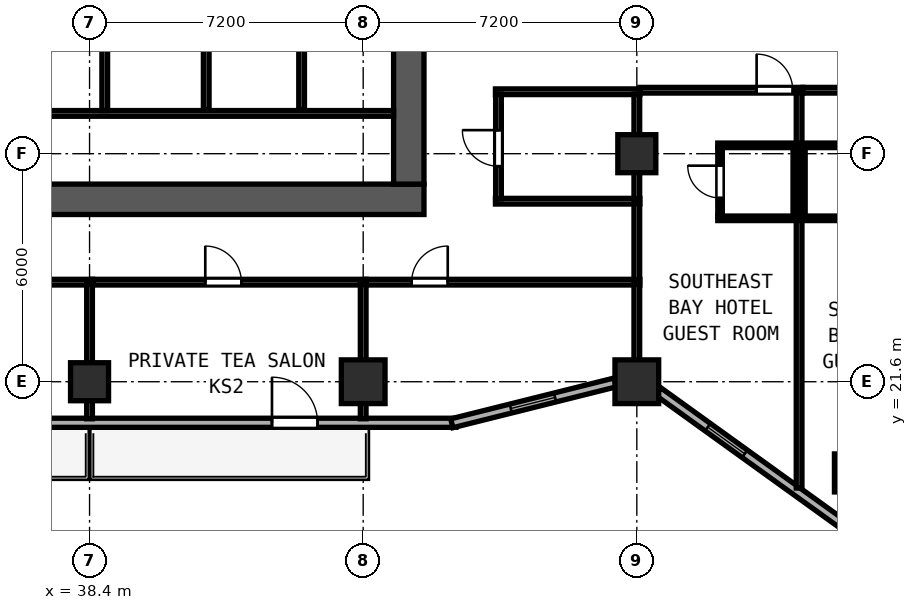
"""IFC4 building model, lengths in metres.
Left out: names, types, materials, properties, quantities, classifications, styles, units other than length and angle.
Written with IfcOpenShell. Run it as: python <this file> out.ifc"""

import sys

from ifc_helpers import new_model, si_unit, direction, frame, frame_2d, origin, origin_2d, place, context, subcontext, project, spatial, rectangle, hollow_rectangle, extrude, element, fill, save


model = new_model("IFC4")
c1 = context("Model", 3, precision=1e-05, world=origin(), true_north=direction((0.0, 1.0)))
c2 = subcontext(c1, "Body", "Model", "MODEL_VIEW")
j1 = project(units=[si_unit("LENGTHUNIT", "METRE"), si_unit("PLANEANGLEUNIT", "RADIAN")], contexts=[c1])
p1 = place(None, origin())
s1 = spatial("IfcSite", under=j1, at=p1, CompositionType="ELEMENT")
p2 = place(p1, origin())
s2 = spatial("IfcBuilding", under=s1, at=p2, CompositionType="ELEMENT")
p3 = place(p2, frame((0.0, 0.0, 62.8)))
s3 = spatial("IfcBuildingStorey", under=s2, at=p3, CompositionType="ELEMENT", Elevation=62.8)
p4 = place(p3, frame((29.6, 26.4, 0.0), z_axis=(0.0, 0.0, 1.0), x_axis=(1.0, 0.0, 0.0)))
e1 = element("IfcWall", 1, at=p4, inside=s3, PredefinedType="SHEAR", context=c2, shape_type="SweptSolid", body=[
    extrude(rectangle(XDim=17.6, YDim=0.8, at=frame_2d((8.8, 0.0))), origin(), (0.0, 0.0, 1.0), 3.6),
])
p5 = place(p4, frame((2.47, 0.0, 0.0), z_axis=(0.0, 0.0, 1.0), x_axis=(-1.0, 0.0, 0.0)))
e2 = element("IfcOpeningElement", 2, at=p5, cuts=e1, PredefinedType="OPENING", context=c2, shape_type="SweptSolid", body=[
    extrude(rectangle(XDim=0.9, YDim=2.1, at=frame_2d((0.45, 1.05))), frame((0.0, 0.41, 0.0), z_axis=(0.0, -1.0, 0.0), x_axis=(1.0, 0.0, 0.0)), (0.0, 0.0, 1.0), 0.82),
])
p6 = place(p4, frame((6.36, 0.0, 0.0), z_axis=(0.0, 0.0, 1.0), x_axis=(-1.0, 0.0, 0.0)))
e3 = element("IfcOpeningElement", 3, at=p6, cuts=e1, PredefinedType="OPENING", context=c2, shape_type="SweptSolid", body=[
    extrude(rectangle(XDim=0.9, YDim=2.1, at=frame_2d((0.45, 1.05))), frame((0.0, 0.41, 0.0), z_axis=(0.0, -1.0, 0.0), x_axis=(1.0, 0.0, 0.0)), (0.0, 0.0, 1.0), 0.82),
])
p7 = place(p3, frame((46.8, 26.8, 0.0), z_axis=(0.0, 0.0, 1.0), x_axis=(0.0, 1.0, 0.0)))
e4 = element("IfcWall", 4, at=p7, inside=s3, PredefinedType="SHEAR", context=c2, shape_type="SweptSolid", body=[
    extrude(rectangle(XDim=4.05, YDim=0.8, at=frame_2d((2.025, 0.0))), origin(), (0.0, 0.0, 1.0), 3.6),
])
for number, where, z_axis, x_axis in (
    (5, (52.8, 21.6, 0.0), (0.0, 0.0, 1.0), (1.0, 0.0, 0.0)),
    (6, (45.6, 21.6, 0.0), (0.0, 0.0, 1.0), (1.0, 0.0, 0.0)),
):
    element("IfcColumn", number, at=place(p3, frame(where, z_axis=z_axis, x_axis=x_axis)), inside=s3, PredefinedType="COLUMN", context=c2, shape_type="SweptSolid", body=[
        extrude(hollow_rectangle(XDim=1.15, YDim=1.15, WallThickness=0.042, at=origin_2d()), origin(), (0.0, 0.0, 1.0), 3.8),
    ])
for number, where, z_axis, x_axis in (
    (7, (52.8, 27.6, 0.0), (0.0, 0.0, 1.0), (1.0, 0.0, 0.0)),
    (8, (38.4, 21.6, 0.0), (0.0, 0.0, 1.0), (1.0, 0.0, 0.0)),
    (9, (58.5, 19.2, 0.0), (0.0, 0.0, 1.0), (1.0, 0.0, 0.0)),
):
    element("IfcColumn", number, at=place(p3, frame(where, z_axis=z_axis, x_axis=x_axis)), inside=s3, PredefinedType="COLUMN", context=c2, shape_type="SweptSolid", body=[
        extrude(hollow_rectangle(XDim=1.0, YDim=1.0, WallThickness=0.038, at=origin_2d()), origin(), (0.0, 0.0, 1.0), 3.8),
    ])
p8 = place(p3, frame((28.76, 20.52, 0.0), z_axis=(0.0, 0.0, 1.0), x_axis=(1.0, 0.0, 0.0)))
e10 = element("IfcWall", 10, at=p8, inside=s3, PredefinedType="SOLIDWALL", context=c2, shape_type="SweptSolid", body=[
    extrude(rectangle(XDim=19.281, YDim=0.24, at=frame_2d((9.64, 0.0))), origin(), (0.0, 0.0, 1.0), 3.6),
])
p9 = place(p8, frame((4.84, 0.0, 0.0), z_axis=(0.0, 0.0, 1.0), x_axis=(-1.0, 0.0, 0.0)))
e11 = element("IfcOpeningElement", 11, at=p9, cuts=e10, PredefinedType="OPENING", context=c2, shape_type="SweptSolid", body=[
    extrude(rectangle(XDim=1.2, YDim=2.15, at=frame_2d((0.6, 1.075))), frame((0.0, 0.13, 0.0), z_axis=(0.0, -1.0, 0.0), x_axis=(1.0, 0.0, 0.0)), (0.0, 0.0, 1.0), 0.26),
])
p10 = place(p8, frame((15.64, 0.0, 0.0), z_axis=(0.0, 0.0, 1.0), x_axis=(-1.0, 0.0, 0.0)))
e12 = element("IfcOpeningElement", 12, at=p10, cuts=e10, PredefinedType="OPENING", context=c2, shape_type="SweptSolid", body=[
    extrude(rectangle(XDim=1.2, YDim=2.15, at=frame_2d((0.6, 1.075))), frame((0.0, 0.13, 0.0), z_axis=(0.0, -1.0, 0.0), x_axis=(1.0, 0.0, 0.0)), (0.0, 0.0, 1.0), 0.26),
])
p11 = place(p3, frame((47.932, 20.507, 0.0), z_axis=(0.0, 0.0, 1.0), x_axis=(0.970145739396, 0.242522667667, 0.0)))
e13 = element("IfcWall", 13, at=p11, inside=s3, PredefinedType="SOLIDWALL", context=c2, shape_type="SweptSolid", body=[
    extrude(rectangle(XDim=4.433, YDim=0.24, at=frame_2d((2.217, 0.0))), origin(), (0.0, 0.0, 1.0), 3.097),
])
p12 = place(p11, frame((1.6, 0.0, 0.85)))
e14 = element("IfcOpeningElement", 14, at=p12, cuts=e13, PredefinedType="OPENING", context=c2, shape_type="SweptSolid", body=[
    extrude(rectangle(XDim=1.2, YDim=1.85, at=frame_2d((0.6, 0.925))), frame((0.0, 0.13, 0.0), z_axis=(0.0, -1.0, 0.0), x_axis=(1.0, 0.0, 0.0)), (0.0, 0.0, 1.0), 0.26),
])
p13 = place(p3, frame((53.367, 21.34, 0.0), z_axis=(0.0, 0.0, 1.0), x_axis=(0.811543176492, -0.58429245476, 0.0)))
e15 = element("IfcWall", 15, at=p13, inside=s3, PredefinedType="SOLIDWALL", context=c2, shape_type="SweptSolid", body=[
    extrude(rectangle(XDim=11.531, YDim=0.24, at=frame_2d((5.765, 0.0))), origin(), (0.0, 0.0, 1.0), 3.097),
])
p14 = place(p13, frame((1.6, 0.0, 0.85)))
e16 = element("IfcOpeningElement", 16, at=p14, cuts=e15, PredefinedType="OPENING", context=c2, shape_type="SweptSolid", body=[
    extrude(rectangle(XDim=1.2, YDim=1.85, at=frame_2d((0.6, 0.925))), frame((0.0, 0.13, 0.0), z_axis=(0.0, -1.0, 0.0), x_axis=(1.0, 0.0, 0.0)), (0.0, 0.0, 1.0), 0.26),
])
p15 = place(p13, frame((7.0, 0.0, 0.85)))
e17 = element("IfcOpeningElement", 17, at=p15, cuts=e15, PredefinedType="OPENING", context=c2, shape_type="SweptSolid", body=[
    extrude(rectangle(XDim=1.2, YDim=1.85, at=frame_2d((0.6, 0.925))), frame((0.0, 0.13, 0.0), z_axis=(0.0, -1.0, 0.0), x_axis=(1.0, 0.0, 0.0)), (0.0, 0.0, 1.0), 0.26),
])
p16 = place(p13, frame((9.99, 0.0, 0.85)))
e18 = element("IfcOpeningElement", 18, at=p16, cuts=e15, PredefinedType="OPENING", context=c2, shape_type="SweptSolid", body=[
    extrude(rectangle(XDim=1.2, YDim=1.85, at=frame_2d((0.6, 0.925))), frame((0.0, 0.13, 0.0), z_axis=(0.0, -1.0, 0.0), x_axis=(1.0, 0.0, 0.0)), (0.0, 0.0, 1.0), 0.26),
])
p17 = place(p3, frame((30.4, 28.66, 0.0), z_axis=(0.0, 0.0, 1.0), x_axis=(1.0, 0.0, 0.0)))
e19 = element("IfcWall", 19, at=p17, inside=s3, PredefinedType="PARTITIONING", context=c2, shape_type="SweptSolid", body=[
    extrude(rectangle(XDim=16.0, YDim=0.15, at=frame_2d((8.0, 0.0))), origin(), (0.0, 0.0, 1.0), 3.6),
])
p18 = place(p3, frame((38.8, 28.735, 0.0), z_axis=(0.0, 0.0, 1.0), x_axis=(0.0, 1.0, 0.0)))
e20 = element("IfcWall", 20, at=p18, inside=s3, PredefinedType="SOLIDWALL", context=c2, shape_type="SweptSolid", body=[
    extrude(rectangle(XDim=1.985, YDim=0.15, at=frame_2d((0.992, 0.0))), origin(), (0.0, 0.0, 1.0), 3.6),
])
for number, where, z_axis, x_axis in (
    (21, (41.47, 28.75, 0.0), (0.0, 0.0, 1.0), (0.0, 1.0, 0.0)),
    (22, (43.98, 28.75, 0.0), (0.0, 0.0, 1.0), (0.0, 1.0, 0.0)),
):
    element("IfcWall", number, at=place(p3, frame(where, z_axis=z_axis, x_axis=x_axis)), inside=s3, PredefinedType="SOLIDWALL", context=c2, shape_type="SweptSolid", body=[
        extrude(rectangle(XDim=1.985, YDim=0.15, at=frame_2d((0.993, 0.0))), origin(), (0.0, 0.0, 1.0), 3.6),
    ])
for number, where, z_axis, x_axis in (
    (23, (49.08, 29.23, 0.0), (0.0, 0.0, 1.0), (1.0, 0.0, 0.0)),
    (24, (49.08, 26.35, 0.0), (0.0, 0.0, 1.0), (1.0, 0.0, 0.0)),
):
    element("IfcWall", number, at=place(p3, frame(where, z_axis=z_axis, x_axis=x_axis)), inside=s3, PredefinedType="PARTITIONING", context=c2, shape_type="SweptSolid", body=[
        extrude(rectangle(XDim=3.8, YDim=0.15, at=frame_2d((1.9, 0.0))), origin(), (0.0, 0.0, 1.0), 3.6),
    ])
p19 = place(p3, frame((49.16, 26.41, 0.0), z_axis=(0.0, 0.0, 1.0), x_axis=(0.0, 1.0, 0.0)))
e25 = element("IfcWall", 25, at=p19, inside=s3, PredefinedType="PARTITIONING", context=c2, shape_type="SweptSolid", body=[
    extrude(rectangle(XDim=2.76, YDim=0.15, at=frame_2d((1.38, 0.0))), origin(), (0.0, 0.0, 1.0), 3.6),
])
p20 = place(p19, frame((0.86, 0.0, 0.0)))
e26 = element("IfcOpeningElement", 26, at=p20, cuts=e25, PredefinedType="OPENING", context=c2, shape_type="SweptSolid", body=[
    extrude(rectangle(XDim=0.95, YDim=2.12, at=frame_2d((0.475, 1.06))), frame((0.0, 0.085, 0.0), z_axis=(0.0, -1.0, 0.0), x_axis=(1.0, 0.0, 0.0)), (0.0, 0.0, 1.0), 0.17),
])
p21 = place(p3, frame((52.8, 26.41, 0.0), z_axis=(0.0, 0.0, 1.0), x_axis=(0.0, 1.0, 0.0)))
e27 = element("IfcWall", 27, at=p21, inside=s3, PredefinedType="PARTITIONING", context=c2, shape_type="SweptSolid", body=[
    extrude(rectangle(XDim=2.76, YDim=0.15, at=frame_2d((1.38, 0.0))), origin(), (0.0, 0.0, 1.0), 3.097),
])
p22 = place(p3, frame((23.92, 24.22, 0.0), z_axis=(0.0, 0.0, 1.0), x_axis=(1.0, 0.0, 0.0)))
e28 = element("IfcWall", 28, at=p22, inside=s3, PredefinedType="PARTITIONING", context=c2, shape_type="SweptSolid", body=[
    extrude(rectangle(XDim=14.56, YDim=0.15, at=frame_2d((7.28, 0.0))), origin(), (0.0, 0.0, 1.0), 3.6),
])
p23 = place(p22, frame((9.445, 0.0, 0.0), z_axis=(0.0, 0.0, 1.0), x_axis=(-1.0, 0.0, 0.0)))
e29 = element("IfcOpeningElement", 29, at=p23, cuts=e28, PredefinedType="OPENING", context=c2, shape_type="SweptSolid", body=[
    extrude(rectangle(XDim=0.95, YDim=2.12, at=frame_2d((0.475, 1.06))), frame((0.0, 0.085, 0.0), z_axis=(0.0, -1.0, 0.0), x_axis=(1.0, 0.0, 0.0)), (0.0, 0.0, 1.0), 0.17),
])
p24 = place(p3, frame((38.4, 20.625, 0.0), z_axis=(0.0, 0.0, 1.0), x_axis=(0.0, 1.0, 0.0)))
e30 = element("IfcWall", 30, at=p24, inside=s3, PredefinedType="PARTITIONING", context=c2, shape_type="SweptSolid", body=[
    extrude(rectangle(XDim=3.535, YDim=0.15, at=frame_2d((1.768, 0.0))), origin(), (0.0, 0.0, 1.0), 2.985),
])
p25 = place(p3, frame((38.482, 24.22, 0.0), z_axis=(0.0, 0.0, 1.0), x_axis=(1.0, 0.0, 0.0)))
e31 = element("IfcWall", 31, at=p25, inside=s3, PredefinedType="PARTITIONING", context=c2, shape_type="SweptSolid", body=[
    extrude(rectangle(XDim=7.198, YDim=0.15, at=frame_2d((3.599, 0.0))), origin(), (0.0, 0.0, 1.0), 3.6),
])
p26 = place(p25, frame((3.913, 0.0, 0.0), z_axis=(0.0, 0.0, 1.0), x_axis=(-1.0, 0.0, 0.0)))
e32 = element("IfcOpeningElement", 32, at=p26, cuts=e31, PredefinedType="OPENING", context=c2, shape_type="SweptSolid", body=[
    extrude(rectangle(XDim=0.95, YDim=2.12, at=frame_2d((0.475, 1.06))), frame((0.0, 0.085, 0.0), z_axis=(0.0, -1.0, 0.0), x_axis=(1.0, 0.0, 0.0)), (0.0, 0.0, 1.0), 0.17),
])
p27 = place(p3, frame((45.6, 20.625, 0.0), z_axis=(0.0, 0.0, 1.0), x_axis=(0.0, 1.0, 0.0)))
e33 = element("IfcWall", 33, at=p27, inside=s3, PredefinedType="PARTITIONING", context=c2, shape_type="SweptSolid", body=[
    extrude(rectangle(XDim=3.535, YDim=0.15, at=frame_2d((1.768, 0.0))), origin(), (0.0, 0.0, 1.0), 2.985),
])
p28 = place(p3, frame((45.682, 24.22, 0.0), z_axis=(0.0, 0.0, 1.0), x_axis=(1.0, 0.0, 0.0)))
e34 = element("IfcWall", 34, at=p28, inside=s3, PredefinedType="PARTITIONING", context=c2, shape_type="SweptSolid", body=[
    extrude(rectangle(XDim=7.198, YDim=0.15, at=frame_2d((3.599, 0.0))), origin(), (0.0, 0.0, 1.0), 3.6),
])
p29 = place(p28, frame((2.143, 0.0, 0.0), z_axis=(0.0, 0.0, 1.0), x_axis=(-1.0, 0.0, 0.0)))
e35 = element("IfcOpeningElement", 35, at=p29, cuts=e34, PredefinedType="OPENING", context=c2, shape_type="SweptSolid", body=[
    extrude(rectangle(XDim=0.95, YDim=2.12, at=frame_2d((0.475, 1.06))), frame((0.0, 0.085, 0.0), z_axis=(0.0, -1.0, 0.0), x_axis=(1.0, 0.0, 0.0)), (0.0, 0.0, 1.0), 0.17),
])
p30 = place(p3, frame((52.8, 21.819, 0.0), z_axis=(0.0, 0.0, 1.0), x_axis=(0.0, 1.0, 0.0)))
e36 = element("IfcWall", 36, at=p30, inside=s3, PredefinedType="PARTITIONING", context=c2, shape_type="SweptSolid", body=[
    extrude(rectangle(XDim=2.341, YDim=0.15, at=frame_2d((1.171, 0.0))), origin(), (0.0, 0.0, 1.0), 3.097),
])
p31 = place(p3, frame((52.882, 29.27, 0.0), z_axis=(0.0, 0.0, 1.0), x_axis=(1.0, 0.0, 0.0)))
e37 = element("IfcWall", 37, at=p31, inside=s3, PredefinedType="PARTITIONING", context=c2, shape_type="SweptSolid", body=[
    extrude(rectangle(XDim=4.288, YDim=0.15, at=frame_2d((2.144, 0.0))), origin(), (0.0, 0.0, 1.0), 3.6),
])
p32 = place(p31, frame((4.02, 0.0, 0.0), z_axis=(0.0, 0.0, 1.0), x_axis=(-1.0, 0.0, 0.0)))
e38 = element("IfcOpeningElement", 38, at=p32, cuts=e37, PredefinedType="OPENING", context=c2, shape_type="SweptSolid", body=[
    extrude(rectangle(XDim=0.95, YDim=2.15, at=frame_2d((0.475, 1.075))), frame((0.0, 0.085, 0.0), z_axis=(0.0, -1.0, 0.0), x_axis=(1.0, 0.0, 0.0)), (0.0, 0.0, 1.0), 0.17),
])
p33 = place(p3, frame((52.8, 24.28, 0.0), z_axis=(0.0, 0.0, 1.0), x_axis=(0.0, 1.0, 0.0)))
e39 = element("IfcWall", 39, at=p33, inside=s3, PredefinedType="PARTITIONING", context=c2, shape_type="SweptSolid", body=[
    extrude(rectangle(XDim=2.01, YDim=0.15, at=frame_2d((1.005, 0.0))), origin(), (0.0, 0.0, 1.0), 3.097),
])
p34 = place(p3, frame((57.07, 18.803, 0.0), z_axis=(0.0, 0.0, 1.0), x_axis=(0.0, 1.0, 0.0)))
e40 = element("IfcWall", 40, at=p34, inside=s3, PredefinedType="PARTITIONING", context=c2, shape_type="SweptSolid", body=[
    extrude(rectangle(XDim=10.407, YDim=0.15, at=frame_2d((5.204, 0.0))), origin(), (0.0, 0.0, 1.0), 3.6),
])
p35 = place(p3, frame((54.93, 27.82, 0.0), z_axis=(0.0, 0.0, 1.0), x_axis=(1.0, 0.0, 0.0)))
e41 = element("IfcWall", 41, at=p35, inside=s3, PredefinedType="PARTITIONING", context=c2, shape_type="SweptSolid", body=[
    extrude(rectangle(XDim=2.08, YDim=0.12, at=frame_2d((1.04, 0.0))), origin(), (0.0, 0.0, 1.0), 3.097),
])
p36 = place(p3, frame((54.93, 25.9, 0.0), z_axis=(0.0, 0.0, 1.0), x_axis=(1.0, 0.0, 0.0)))
e42 = element("IfcWall", 42, at=p36, inside=s3, PredefinedType="PARTITIONING", context=c2, shape_type="SweptSolid", body=[
    extrude(rectangle(XDim=2.08, YDim=0.12, at=frame_2d((1.04, 0.0))), origin(), (0.0, 0.0, 1.0), 3.6),
])
p37 = place(p3, frame((54.99, 25.945, 0.0), z_axis=(0.0, 0.0, 1.0), x_axis=(0.0, 1.0, 0.0)))
e43 = element("IfcWall", 43, at=p37, inside=s3, PredefinedType="PARTITIONING", context=c2, shape_type="SweptSolid", body=[
    extrude(rectangle(XDim=1.83, YDim=0.12, at=frame_2d((0.915, 0.0))), origin(), (0.0, 0.0, 1.0), 3.6),
])
p38 = place(p37, frame((1.34, 0.0, 0.0), z_axis=(0.0, 0.0, 1.0), x_axis=(-1.0, 0.0, 0.0)))
e44 = element("IfcOpeningElement", 44, at=p38, cuts=e43, PredefinedType="OPENING", context=c2, shape_type="SweptSolid", body=[
    extrude(rectangle(XDim=0.85, YDim=2.1, at=frame_2d((0.425, 1.05))), frame((0.0, 0.07, 0.0), z_axis=(0.0, -1.0, 0.0), x_axis=(1.0, 0.0, 0.0)), (0.0, 0.0, 1.0), 0.14),
])
p39 = place(p3, frame((56.97, 25.945, 0.0), z_axis=(0.0, 0.0, 1.0), x_axis=(0.0, 1.0, 0.0)))
e45 = element("IfcWall", 45, at=p39, inside=s3, PredefinedType="PARTITIONING", context=c2, shape_type="SweptSolid", body=[
    extrude(rectangle(XDim=1.83, YDim=0.12, at=frame_2d((0.915, 0.0))), origin(), (0.0, 0.0, 1.0), 3.6),
])
p40 = place(p3, frame((57.172, 29.27, 0.0), z_axis=(0.0, 0.0, 1.0), x_axis=(1.0, 0.0, 0.0)))
e46 = element("IfcWall", 46, at=p40, inside=s3, PredefinedType="PARTITIONING", context=c2, shape_type="SweptSolid", body=[
    extrude(rectangle(XDim=4.268, YDim=0.15, at=frame_2d((2.134, 0.0))), origin(), (0.0, 0.0, 1.0), 3.6),
])
p41 = place(p40, frame((2.959, 0.0, 0.0), z_axis=(0.0, 0.0, 1.0), x_axis=(-1.0, 0.0, 0.0)))
e47 = element("IfcOpeningElement", 47, at=p41, cuts=e46, PredefinedType="OPENING", context=c2, shape_type="SweptSolid", body=[
    extrude(rectangle(XDim=0.95, YDim=2.15, at=frame_2d((0.475, 1.075))), frame((0.0, 0.085, 0.0), z_axis=(0.0, -1.0, 0.0), x_axis=(1.0, 0.0, 0.0)), (0.0, 0.0, 1.0), 0.17),
])
p42 = place(p3, frame((57.13, 27.82, 0.0), z_axis=(0.0, 0.0, 1.0), x_axis=(1.0, 0.0, 0.0)))
e48 = element("IfcWall", 48, at=p42, inside=s3, PredefinedType="PARTITIONING", context=c2, shape_type="SweptSolid", body=[
    extrude(rectangle(XDim=2.08, YDim=0.12, at=frame_2d((1.04, 0.0))), origin(), (0.0, 0.0, 1.0), 3.097),
])
p43 = place(p3, frame((57.13, 25.9, 0.0), z_axis=(0.0, 0.0, 1.0), x_axis=(1.0, 0.0, 0.0)))
e49 = element("IfcWall", 49, at=p43, inside=s3, PredefinedType="PARTITIONING", context=c2, shape_type="SweptSolid", body=[
    extrude(rectangle(XDim=2.08, YDim=0.12, at=frame_2d((1.04, 0.0))), origin(), (0.0, 0.0, 1.0), 3.6),
])
p44 = place(p3, frame((57.17, 25.945, 0.0), z_axis=(0.0, 0.0, 1.0), x_axis=(0.0, 1.0, 0.0)))
e50 = element("IfcWall", 50, at=p44, inside=s3, PredefinedType="PARTITIONING", context=c2, shape_type="SweptSolid", body=[
    extrude(rectangle(XDim=1.83, YDim=0.12, at=frame_2d((0.915, 0.0))), origin(), (0.0, 0.0, 1.0), 3.6),
])
p45 = place(p12, origin())
e51 = element("IfcWindow", 51, at=p45, inside=s3, PartitioningType="SINGLE_PANEL", PredefinedType="WINDOW", context=c2, shape_type="SweptSolid", body=[
    extrude(rectangle(XDim=1.2, YDim=1.85, at=frame_2d((0.6, 0.925))), frame((0.0, 0.03, 0.0), z_axis=(0.0, -1.0, 0.0), x_axis=(1.0, 0.0, 0.0)), (0.0, 0.0, 1.0), 0.06),
])
fill(e14, e51)
p46 = place(p14, origin())
e52 = element("IfcWindow", 52, at=p46, inside=s3, PartitioningType="SINGLE_PANEL", PredefinedType="WINDOW", context=c2, shape_type="SweptSolid", body=[
    extrude(rectangle(XDim=1.2, YDim=1.85, at=frame_2d((0.6, 0.925))), frame((0.0, 0.03, 0.0), z_axis=(0.0, -1.0, 0.0), x_axis=(1.0, 0.0, 0.0)), (0.0, 0.0, 1.0), 0.06),
])
fill(e16, e52)
p47 = place(p10, origin())
e53 = element("IfcDoor", 53, at=p47, inside=s3, OperationType="SINGLE_SWING_RIGHT", PredefinedType="DOOR", context=c2, shape_type="SweptSolid", body=[
    extrude(rectangle(XDim=1.2, YDim=2.15, at=frame_2d((0.6, 1.075))), frame((0.0, 0.025, 0.0), z_axis=(0.0, -1.0, 0.0), x_axis=(1.0, 0.0, 0.0)), (0.0, 0.0, 1.0), 0.05),
])
fill(e12, e53)
p48 = place(p20, origin())
e54 = element("IfcDoor", 54, at=p48, inside=s3, OperationType="SINGLE_SWING_RIGHT", PredefinedType="DOOR", context=c2, shape_type="SweptSolid", body=[
    extrude(rectangle(XDim=0.95, YDim=2.12, at=frame_2d((0.475, 1.06))), frame((0.0, 0.025, 0.0), z_axis=(0.0, -1.0, 0.0), x_axis=(1.0, 0.0, 0.0)), (0.0, 0.0, 1.0), 0.05),
])
fill(e26, e54)
p49 = place(p26, origin())
e55 = element("IfcDoor", 55, at=p49, inside=s3, OperationType="SINGLE_SWING_RIGHT", PredefinedType="DOOR", context=c2, shape_type="SweptSolid", body=[
    extrude(rectangle(XDim=0.95, YDim=2.12, at=frame_2d((0.475, 1.06))), frame((0.0, 0.025, 0.0), z_axis=(0.0, -1.0, 0.0), x_axis=(1.0, 0.0, 0.0)), (0.0, 0.0, 1.0), 0.05),
])
fill(e32, e55)
p50 = place(p29, origin())
e56 = element("IfcDoor", 56, at=p50, inside=s3, OperationType="SINGLE_SWING_LEFT", PredefinedType="DOOR", context=c2, shape_type="SweptSolid", body=[
    extrude(rectangle(XDim=0.95, YDim=2.12, at=frame_2d((0.475, 1.06))), frame((0.0, 0.025, 0.0), z_axis=(0.0, -1.0, 0.0), x_axis=(1.0, 0.0, 0.0)), (0.0, 0.0, 1.0), 0.05),
])
fill(e35, e56)
p51 = place(p32, origin())
e57 = element("IfcDoor", 57, at=p51, inside=s3, OperationType="SINGLE_SWING_RIGHT", PredefinedType="DOOR", context=c2, shape_type="SweptSolid", body=[
    extrude(rectangle(XDim=0.95, YDim=2.15, at=frame_2d((0.475, 1.075))), frame((0.0, 0.025, 0.0), z_axis=(0.0, -1.0, 0.0), x_axis=(1.0, 0.0, 0.0)), (0.0, 0.0, 1.0), 0.05),
])
fill(e38, e57)
p52 = place(p38, origin())
e58 = element("IfcDoor", 58, at=p52, inside=s3, OperationType="SINGLE_SWING_LEFT", PredefinedType="DOOR", context=c2, shape_type="SweptSolid", body=[
    extrude(rectangle(XDim=0.85, YDim=2.1, at=frame_2d((0.425, 1.05))), frame((0.0, 0.025, 0.0), z_axis=(0.0, -1.0, 0.0), x_axis=(1.0, 0.0, 0.0)), (0.0, 0.0, 1.0), 0.05),
])
fill(e44, e58)
save(model, sys.argv[1])
